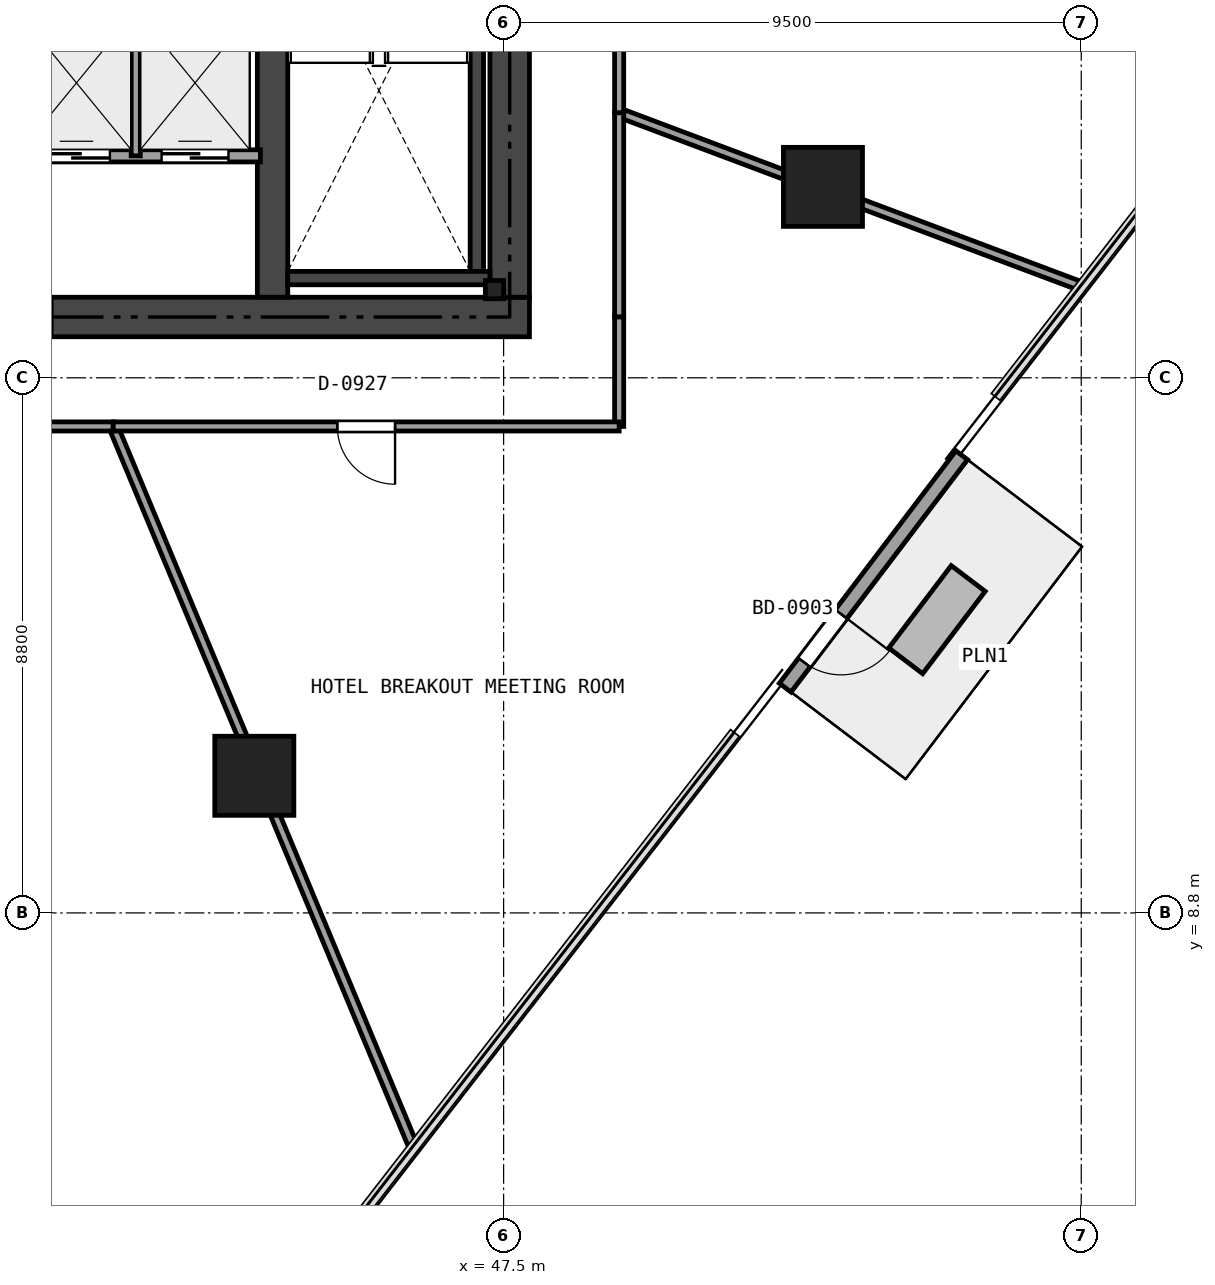
"""IFC4 building model, lengths in metres.
Left out: names, types, materials, properties, quantities, classifications, styles, units other than length and angle.
Written with IfcOpenShell. Run it as: python <this file> out.ifc"""

import sys

from ifc_helpers import new_model, si_unit, direction, frame, frame_2d, origin, origin_2d, place, context, subcontext, project, spatial, rectangle, i_section, extrude, element, fill, save


model = new_model("IFC4")
c1 = context("Model", 3, precision=1e-05, world=origin(), true_north=direction((0.0, 1.0)))
c2 = subcontext(c1, "Body", "Model", "MODEL_VIEW")
j1 = project(units=[si_unit("LENGTHUNIT", "METRE"), si_unit("PLANEANGLEUNIT", "RADIAN")], contexts=[c1])
p1 = place(None, origin())
s1 = spatial("IfcSite", under=j1, at=p1, CompositionType="ELEMENT")
p2 = place(p1, origin())
s2 = spatial("IfcBuilding", under=s1, at=p2, CompositionType="ELEMENT")
p3 = place(p2, frame((0.0, 0.0, 40.8)))
s3 = spatial("IfcBuildingStorey", under=s2, at=p3, CompositionType="ELEMENT", Elevation=40.8)
p4 = place(p3, frame((26.475, 18.6, 0.0), z_axis=(0.0, 0.0, 1.0), x_axis=(1.0, 0.0, 0.0)))
e1 = element("IfcWall", 1, at=p4, inside=s3, PredefinedType="SHEAR", context=c2, shape_type="SweptSolid", body=[
    extrude(rectangle(XDim=21.45, YDim=0.65, at=frame_2d((10.725, 0.0))), origin(), (0.0, 0.0, 1.0), 3.17),
])
p5 = place(p4, frame((12.45, 0.0, 0.0)))
e2 = element("IfcOpeningElement", 2, at=p5, cuts=e1, PredefinedType="OPENING", context=c2, shape_type="SweptSolid", body=[
    extrude(rectangle(XDim=1.15, YDim=2.15, at=frame_2d((0.575, 1.075))), frame((0.0, 0.335, 0.0), z_axis=(0.0, -1.0, 0.0), x_axis=(1.0, 0.0, 0.0)), (0.0, 0.0, 1.0), 0.67),
])
p6 = place(p4, frame((5.275, 0.0, 0.0)))
e3 = element("IfcOpeningElement", 3, at=p6, cuts=e1, PredefinedType="OPENING", context=c2, shape_type="SweptSolid", body=[
    extrude(rectangle(XDim=0.9, YDim=2.1, at=frame_2d((0.45, 1.05))), frame((0.0, 0.335, 0.0), z_axis=(0.0, -1.0, 0.0), x_axis=(1.0, 0.0, 0.0)), (0.0, 0.0, 1.0), 0.67),
])
p7 = place(p3, frame((47.6, 18.925, 0.0), z_axis=(0.0, 0.0, 1.0), x_axis=(0.0, 1.0, 0.0)))
e4 = element("IfcWall", 4, at=p7, inside=s3, PredefinedType="SHEAR", context=c2, shape_type="SweptSolid", body=[
    extrude(rectangle(XDim=14.95, YDim=0.65, at=frame_2d((7.475, 0.0))), origin(), (0.0, 0.0, 1.0), 3.17),
])
p8 = place(p7, frame((6.575, 0.0, 0.0)))
e5 = element("IfcOpeningElement", 5, at=p8, cuts=e4, PredefinedType="OPENING", context=c2, shape_type="SweptSolid", body=[
    extrude(rectangle(XDim=1.1, YDim=2.15, at=frame_2d((0.55, 1.075))), frame((0.0, 0.335, 0.0), z_axis=(0.0, -1.0, 0.0), x_axis=(1.0, 0.0, 0.0)), (0.0, 0.0, 1.0), 0.67),
])
p9 = place(p7, frame((8.475, 0.0, 0.0)))
e6 = element("IfcOpeningElement", 6, at=p9, cuts=e4, PredefinedType="OPENING", context=c2, shape_type="SweptSolid", body=[
    extrude(rectangle(XDim=0.9, YDim=2.1, at=frame_2d((0.45, 1.05))), frame((0.0, 0.335, 0.0), z_axis=(0.0, -1.0, 0.0), x_axis=(1.0, 0.0, 0.0)), (0.0, 0.0, 1.0), 0.67),
])
p10 = place(p7, frame((13.125, 0.0, 0.0)))
e7 = element("IfcOpeningElement", 7, at=p10, cuts=e4, PredefinedType="OPENING", context=c2, shape_type="SweptSolid", body=[
    extrude(rectangle(XDim=0.9, YDim=2.1, at=frame_2d((0.45, 1.05))), frame((0.0, 0.335, 0.0), z_axis=(0.0, -1.0, 0.0), x_axis=(1.0, 0.0, 0.0)), (0.0, 0.0, 1.0), 0.67),
])
p11 = place(p3, frame((43.7, 18.925, 0.0), z_axis=(0.0, 0.0, 1.0), x_axis=(0.0, 1.0, 0.0)))
e8 = element("IfcWall", 8, at=p11, inside=s3, PredefinedType="SHEAR", context=c2, shape_type="SweptSolid", body=[
    extrude(rectangle(XDim=14.95, YDim=0.5, at=frame_2d((7.475, 0.0))), origin(), (0.0, 0.0, 1.0), 3.17),
])
p12 = place(p11, frame((8.075, 0.0, 0.0)))
e9 = element("IfcOpeningElement", 9, at=p12, cuts=e8, PredefinedType="OPENING", context=c2, shape_type="SweptSolid", body=[
    extrude(rectangle(XDim=0.9, YDim=2.1, at=frame_2d((0.45, 1.05))), frame((0.0, 0.26, 0.0), z_axis=(0.0, -1.0, 0.0), x_axis=(1.0, 0.0, 0.0)), (0.0, 0.0, 1.0), 0.52),
])
p13 = place(p3, frame((47.06, 19.35, 0.0), z_axis=(0.0, 0.0, 1.0), x_axis=(0.0, 1.0, 0.0)))
e10 = element("IfcWall", 10, at=p13, inside=s3, PredefinedType="SHEAR", context=c2, shape_type="SweptSolid", body=[
    extrude(rectangle(XDim=5.9, YDim=0.22, at=frame_2d((2.95, 0.0))), origin(), (0.0, 0.0, 1.0), 3.17),
])
p14 = place(p3, frame((43.95, 19.24, 0.0), z_axis=(0.0, 0.0, 1.0), x_axis=(1.0, 0.0, 0.0)))
e11 = element("IfcWall", 11, at=p14, inside=s3, PredefinedType="SHEAR", context=c2, shape_type="SweptSolid", body=[
    extrude(rectangle(XDim=3.325, YDim=0.22, at=frame_2d((1.663, 0.0))), origin(), (0.0, 0.0, 1.0), 3.17),
])
for number, where, z_axis, x_axis in (
    (12, (43.4, 11.055, 0.0), (0.0, 0.0, 1.0), (1.0, 0.0, 0.0)),
    (13, (52.752, 20.74, 0.0), (0.0, 0.0, 1.0), (1.0, 0.0, 0.0)),
):
    element("IfcColumn", number, at=place(p3, frame(where, z_axis=z_axis, x_axis=x_axis)), inside=s3, PredefinedType="COLUMN", context=c2, shape_type="SweptSolid", body=[
        extrude(rectangle(XDim=1.3, YDim=1.3, at=origin_2d()), origin(), (0.0, 0.0, 1.0), 3.17),
    ])
p15 = place(p3, frame((47.35, 19.05, 0.0), z_axis=(0.0, 0.0, 1.0), x_axis=(1.0, 0.0, 0.0)))
e14 = element("IfcColumn", 14, at=p15, inside=s3, PredefinedType="PILASTER", context=c2, shape_type="SweptSolid", body=[
    extrude(i_section(OverallWidth=0.3, OverallDepth=0.3, WebThickness=0.011, FlangeThickness=0.019, at=origin_2d()), origin(), (0.0, 0.0, 1.0), 3.17),
])
p16 = place(p3, frame((55.034, 16.327, 0.0), z_axis=(0.0, 0.0, 1.0), x_axis=(-0.604733735357, -0.796427717574, 0.0)))
e15 = element("IfcWall", 15, at=p16, inside=s3, PredefinedType="SOLIDWALL", context=c2, shape_type="SweptSolid", body=[
    extrude(rectangle(XDim=4.8, YDim=0.24, at=frame_2d((2.4, 0.0))), origin(), (0.0, 0.0, 1.0), 3.17),
])
p17 = place(p16, frame((3.28, 0.0, 0.0)))
e16 = element("IfcOpeningElement", 16, at=p17, cuts=e15, PredefinedType="OPENING", context=c2, shape_type="SweptSolid", body=[
    extrude(rectangle(XDim=1.0, YDim=2.15, at=frame_2d((0.5, 1.075))), frame((0.0, 0.13, 0.0), z_axis=(0.0, -1.0, 0.0), x_axis=(1.0, 0.0, 0.0)), (0.0, 0.0, 1.0), 0.26),
])
p18 = place(p3, frame((35.62, 21.25, 0.0), z_axis=(0.0, 0.0, 1.0), x_axis=(1.0, 0.0, 0.0)))
e17 = element("IfcWall", 17, at=p18, inside=s3, PredefinedType="SOLIDWALL", context=c2, shape_type="SweptSolid", body=[
    extrude(rectangle(XDim=7.88, YDim=0.2, at=frame_2d((3.94, 0.0))), origin(), (0.0, 0.0, 1.0), 3.17),
])
p19 = place(p18, frame((0.405, 0.0, 0.0)))
e18 = element("IfcOpeningElement", 18, at=p19, cuts=e17, PredefinedType="OPENING", context=c2, shape_type="SweptSolid", body=[
    extrude(rectangle(XDim=1.1, YDim=2.15, at=frame_2d((0.55, 1.075))), frame((0.0, 0.11, 0.0), z_axis=(0.0, -1.0, 0.0), x_axis=(1.0, 0.0, 0.0)), (0.0, 0.0, 1.0), 0.22),
])
p20 = place(p18, frame((2.355, 0.0, 0.0)))
e19 = element("IfcOpeningElement", 19, at=p20, cuts=e17, PredefinedType="OPENING", context=c2, shape_type="SweptSolid", body=[
    extrude(rectangle(XDim=1.1, YDim=2.15, at=frame_2d((0.55, 1.075))), frame((0.0, 0.11, 0.0), z_axis=(0.0, -1.0, 0.0), x_axis=(1.0, 0.0, 0.0)), (0.0, 0.0, 1.0), 0.22),
])
p21 = place(p18, frame((4.305, 0.0, 0.0)))
e20 = element("IfcOpeningElement", 20, at=p21, cuts=e17, PredefinedType="OPENING", context=c2, shape_type="SweptSolid", body=[
    extrude(rectangle(XDim=1.1, YDim=2.15, at=frame_2d((0.55, 1.075))), frame((0.0, 0.11, 0.0), z_axis=(0.0, -1.0, 0.0), x_axis=(1.0, 0.0, 0.0)), (0.0, 0.0, 1.0), 0.22),
])
p22 = place(p18, frame((6.255, 0.0, 0.0)))
e21 = element("IfcOpeningElement", 21, at=p22, cuts=e17, PredefinedType="OPENING", context=c2, shape_type="SweptSolid", body=[
    extrude(rectangle(XDim=1.1, YDim=2.15, at=frame_2d((0.55, 1.075))), frame((0.0, 0.11, 0.0), z_axis=(0.0, -1.0, 0.0), x_axis=(1.0, 0.0, 0.0)), (0.0, 0.0, 1.0), 0.22),
])
p23 = place(p3, frame((41.45, 21.25, 0.0), z_axis=(0.0, 0.0, 1.0), x_axis=(0.0, 1.0, 0.0)))
e22 = element("IfcWall", 22, at=p23, inside=s3, PredefinedType="PARTITIONING", context=c2, shape_type="SweptSolid", body=[
    extrude(rectangle(XDim=2.4, YDim=0.15, at=frame_2d((1.2, 0.0))), origin(), (0.0, 0.0, 1.0), 2.691),
])
p24 = place(p3, frame((46.04, 4.895, 0.0), z_axis=(0.0, 0.0, 1.0), x_axis=(-0.384648987158, 0.9230629213, 0.0)))
e23 = element("IfcWall", 23, at=p24, inside=s3, PredefinedType="PARTITIONING", context=c2, shape_type="SweptSolid", body=[
    extrude(rectangle(XDim=12.897, YDim=0.15, at=frame_2d((6.449, 0.0))), origin(), (0.0, 0.0, 1.0), 2.395),
])
p25 = place(p3, frame((41.079, 16.8, 0.0), z_axis=(0.0, 0.0, 1.0), x_axis=(-1.0, 0.0, 0.0)))
e24 = element("IfcWall", 24, at=p25, inside=s3, PredefinedType="PARTITIONING", context=c2, shape_type="SweptSolid", body=[
    extrude(rectangle(XDim=6.998, YDim=0.15, at=frame_2d((3.499, 0.0))), origin(), (0.0, 0.0, 1.0), 2.395),
])
p26 = place(p25, frame((3.024, 0.0, 0.0)))
e25 = element("IfcOpeningElement", 25, at=p26, cuts=e24, PredefinedType="OPENING", context=c2, shape_type="SweptSolid", body=[
    extrude(rectangle(XDim=0.95, YDim=2.15, at=frame_2d((0.475, 1.075))), frame((0.0, 0.085, 0.0), z_axis=(0.0, -1.0, 0.0), x_axis=(1.0, 0.0, 0.0)), (0.0, 0.0, 1.0), 0.17),
])
p27 = place(p3, frame((57.044, 19.087, 0.0), z_axis=(0.0, 0.0, 1.0), x_axis=(-0.936065987827, 0.351824482426, 0.0)))
e26 = element("IfcWall", 26, at=p27, inside=s3, PredefinedType="PARTITIONING", context=c2, shape_type="SweptSolid", body=[
    extrude(rectangle(XDim=8.166, YDim=0.15, at=frame_2d((4.083, 0.0))), origin(), (0.0, 0.0, 1.0), 2.395),
])
p28 = place(p3, frame((49.4, 21.96, 0.0), z_axis=(0.0, 0.0, 1.0), x_axis=(0.0, -1.0, 0.0)))
e27 = element("IfcWall", 27, at=p28, inside=s3, PredefinedType="PARTITIONING", context=c2, shape_type="SweptSolid", body=[
    extrude(rectangle(XDim=3.36, YDim=0.15, at=frame_2d((1.68, 0.0))), origin(), (0.0, 0.0, 1.0), 2.395),
])
p29 = place(p3, frame((49.4, 18.6, 0.0), z_axis=(0.0, 0.0, 1.0), x_axis=(0.0, -1.0, 0.0)))
e28 = element("IfcWall", 28, at=p29, inside=s3, PredefinedType="PARTITIONING", context=c2, shape_type="SweptSolid", body=[
    extrude(rectangle(XDim=1.8, YDim=0.15, at=frame_2d((0.9, 0.0))), origin(), (0.0, 0.0, 1.0), 2.355),
])
p30 = place(p3, frame((49.4, 16.8, 0.0), z_axis=(0.0, 0.0, 1.0), x_axis=(-1.0, 0.0, 0.0)))
e29 = element("IfcWall", 29, at=p30, inside=s3, PredefinedType="PARTITIONING", context=c2, shape_type="SweptSolid", body=[
    extrude(rectangle(XDim=8.321, YDim=0.15, at=frame_2d((4.16, 0.0))), origin(), (0.0, 0.0, 1.0), 2.355),
])
p31 = place(p30, frame((3.685, 0.0, 0.0)))
e30 = element("IfcOpeningElement", 30, at=p31, cuts=e29, PredefinedType="OPENING", context=c2, shape_type="SweptSolid", body=[
    extrude(rectangle(XDim=0.95, YDim=2.15, at=frame_2d((0.475, 1.075))), frame((0.0, 0.085, 0.0), z_axis=(0.0, -1.0, 0.0), x_axis=(1.0, 0.0, 0.0)), (0.0, 0.0, 1.0), 0.17),
])
p32 = place(p3, frame((49.4, 28.993, 0.0), z_axis=(0.0, 0.0, 1.0), x_axis=(0.0, -1.0, 0.0)))
e31 = element("IfcWall", 31, at=p32, inside=s3, PredefinedType="PARTITIONING", context=c2, shape_type="SweptSolid", body=[
    extrude(rectangle(XDim=7.033, YDim=0.15, at=frame_2d((3.517, 0.0))), origin(), (0.0, 0.0, 1.0), 2.395),
])
p33 = place(p32, frame((3.041, 0.0, 0.0)))
e32 = element("IfcOpeningElement", 32, at=p33, cuts=e31, PredefinedType="OPENING", context=c2, shape_type="SweptSolid", body=[
    extrude(rectangle(XDim=0.95, YDim=2.15, at=frame_2d((0.475, 1.075))), frame((0.0, 0.085, 0.0), z_axis=(0.0, -1.0, 0.0), x_axis=(1.0, 0.0, 0.0)), (0.0, 0.0, 1.0), 0.17),
])
p34 = place(p17, origin())
e33 = element("IfcDoor", 33, at=p34, inside=s3, OperationType="SINGLE_SWING_LEFT", PredefinedType="DOOR", context=c2, shape_type="SweptSolid", body=[
    extrude(rectangle(XDim=1.0, YDim=2.15, at=frame_2d((0.5, 1.075))), frame((0.0, 0.025, 0.0), z_axis=(0.0, -1.0, 0.0), x_axis=(1.0, 0.0, 0.0)), (0.0, 0.0, 1.0), 0.05),
])
fill(e16, e33)
p35 = place(p21, origin())
e34 = element("IfcDoor", 34, at=p35, inside=s3, OperationType="SLIDING_TO_LEFT", PredefinedType="DOOR", context=c2, shape_type="SweptSolid", body=[
    extrude(rectangle(XDim=1.1, YDim=2.15, at=frame_2d((0.55, 1.075))), frame((0.0, 0.025, 0.0), z_axis=(0.0, -1.0, 0.0), x_axis=(1.0, 0.0, 0.0)), (0.0, 0.0, 1.0), 0.05),
])
fill(e20, e34)
p36 = place(p22, origin())
e35 = element("IfcDoor", 35, at=p36, inside=s3, OperationType="SLIDING_TO_LEFT", PredefinedType="DOOR", context=c2, shape_type="SweptSolid", body=[
    extrude(rectangle(XDim=1.1, YDim=2.15, at=frame_2d((0.55, 1.075))), frame((0.0, 0.025, 0.0), z_axis=(0.0, -1.0, 0.0), x_axis=(1.0, 0.0, 0.0)), (0.0, 0.0, 1.0), 0.05),
])
fill(e21, e35)
p37 = place(p31, origin())
e36 = element("IfcDoor", 36, at=p37, inside=s3, OperationType="SINGLE_SWING_LEFT", PredefinedType="DOOR", context=c2, shape_type="SweptSolid", body=[
    extrude(rectangle(XDim=0.95, YDim=2.15, at=frame_2d((0.475, 1.075))), frame((0.0, 0.025, 0.0), z_axis=(0.0, -1.0, 0.0), x_axis=(1.0, 0.0, 0.0)), (0.0, 0.0, 1.0), 0.05),
])
fill(e30, e36)
save(model, sys.argv[1])
